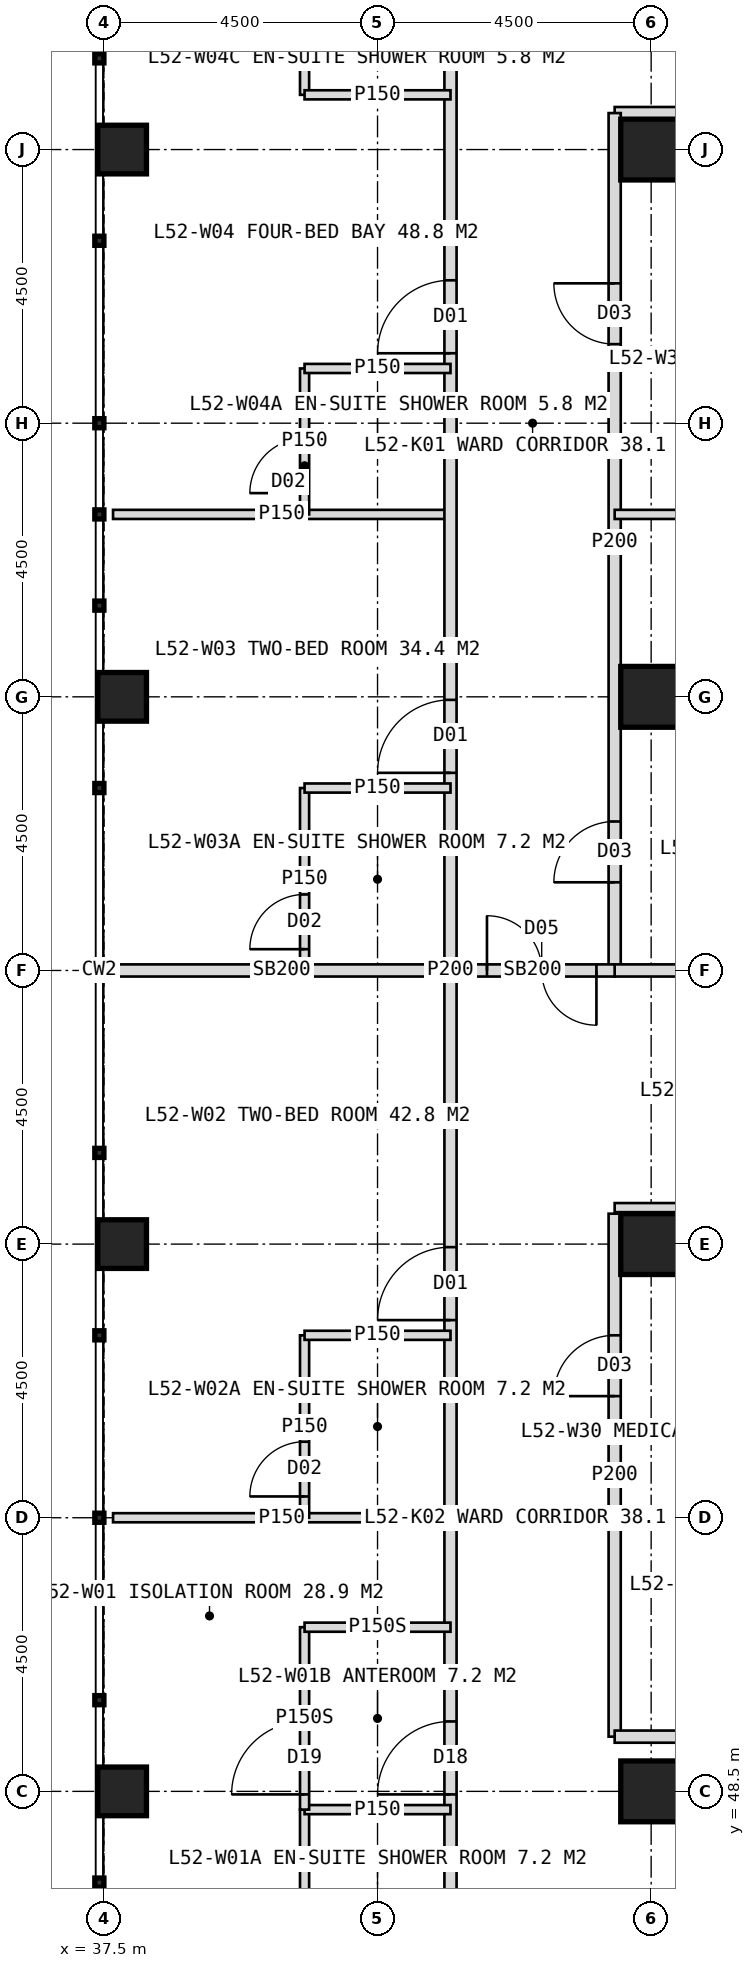
"""IFC4 building model, lengths in metres.
Left out: names, types, materials, properties, quantities, classifications, styles, units other than length and angle.
Written with IfcOpenShell. Run it as: python <this file> out.ifc"""

import sys

from ifc_helpers import new_model, si_unit, direction, frame, frame_2d, origin, origin_2d, place, context, subcontext, project, spatial, rectangle, hollow_rectangle, extrude, element, fill, save


model = new_model("IFC4")
c1 = context("Model", 3, precision=1e-05, world=origin(), true_north=direction((0.0, 1.0)))
c2 = subcontext(c1, "Body", "Model", "MODEL_VIEW")
j1 = project(units=[si_unit("LENGTHUNIT", "METRE"), si_unit("PLANEANGLEUNIT", "RADIAN")], contexts=[c1])
p1 = place(None, origin())
s1 = spatial("IfcSite", under=j1, at=p1, CompositionType="ELEMENT")
p2 = place(p1, origin())
s2 = spatial("IfcBuilding", under=s1, at=p2, CompositionType="ELEMENT")
p3 = place(p2, frame((0.0, 0.0, 217.0)))
s3 = spatial("IfcBuildingStorey", under=s2, at=p3, CompositionType="ELEMENT", Elevation=217.0)
for number, where, z_axis, x_axis in (
    (1, (46.5, 48.5, 0.0), (0.0, 0.0, 1.0), (1.0, 0.0, 0.0)),
    (2, (46.5, 75.5, 0.0), (0.0, 0.0, 1.0), (1.0, 0.0, 0.0)),
    (3, (46.5, 57.5, 0.0), (0.0, 0.0, 1.0), (1.0, 0.0, 0.0)),
    (4, (46.5, 66.5, 0.0), (0.0, 0.0, 1.0), (1.0, 0.0, 0.0)),
):
    element("IfcColumn", number, at=place(p3, frame(where, z_axis=z_axis, x_axis=x_axis)), inside=s3, PredefinedType="COLUMN", context=c2, shape_type="SweptSolid", body=[
        extrude(hollow_rectangle(XDim=1.0, YDim=1.0, WallThickness=0.1, at=origin_2d()), origin(), (0.0, 0.0, 1.0), 4.0),
    ])
for number, where, z_axis, x_axis in (
    (5, (37.8, 48.5, 0.0), (0.0, 0.0, 1.0), (1.0, 0.0, 0.0)),
    (6, (37.8, 57.5, 0.0), (0.0, 0.0, 1.0), (1.0, 0.0, 0.0)),
    (7, (37.8, 66.5, 0.0), (0.0, 0.0, 1.0), (1.0, 0.0, 0.0)),
    (8, (37.8, 75.5, 0.0), (0.0, 0.0, 1.0), (1.0, 0.0, 0.0)),
):
    element("IfcColumn", number, at=place(p3, frame(where, z_axis=z_axis, x_axis=x_axis)), inside=s3, PredefinedType="COLUMN", context=c2, shape_type="SweptSolid", body=[
        extrude(hollow_rectangle(XDim=0.8, YDim=0.8, WallThickness=0.08, at=origin_2d()), origin(), (0.0, 0.0, 1.0), 4.0),
    ])
p4 = place(p3, frame((45.9, 76.1, 0.0), z_axis=(0.0, 0.0, 1.0), x_axis=(1.0, 0.0, 0.0)))
e9 = element("IfcWall", 9, at=p4, inside=s3, PredefinedType="PARTITIONING", context=c2, shape_type="SweptSolid", body=[
    extrude(rectangle(XDim=5.1, YDim=0.2, at=frame_2d((2.55, 0.0))), origin(), (0.0, 0.0, 1.0), 3.75),
])
p5 = place(p3, frame((43.2, 53.0, 0.0), z_axis=(0.0, 0.0, 1.0), x_axis=(-1.0, 0.0, 0.0)))
e10 = element("IfcWall", 10, at=p5, inside=s3, PredefinedType="PARTITIONING", context=c2, shape_type="SweptSolid", body=[
    extrude(rectangle(XDim=5.55, YDim=0.15, at=frame_2d((2.775, 0.0))), origin(), (0.0, 0.0, 1.0), 3.75),
])
p6 = place(p3, frame((43.2, 62.0, 0.0), z_axis=(0.0, 0.0, 1.0), x_axis=(-1.0, 0.0, 0.0)))
e11 = element("IfcWall", 11, at=p6, inside=s3, PredefinedType="SOLIDWALL", context=c2, shape_type="SweptSolid", body=[
    extrude(rectangle(XDim=5.55, YDim=0.2, at=frame_2d((2.775, 0.0))), origin(), (0.0, 0.0, 1.0), 2.95),
])
p7 = place(p3, frame((43.2, 69.5, 0.0), z_axis=(0.0, 0.0, 1.0), x_axis=(-1.0, 0.0, 0.0)))
e12 = element("IfcWall", 12, at=p7, inside=s3, PredefinedType="PARTITIONING", context=c2, shape_type="SweptSolid", body=[
    extrude(rectangle(XDim=5.55, YDim=0.15, at=frame_2d((2.775, 0.0))), origin(), (0.0, 0.0, 1.0), 3.75),
])
p8 = place(p3, frame((43.2, 45.2, 0.0), z_axis=(0.0, 0.0, 1.0), x_axis=(0.0, 1.0, 0.0)))
e13 = element("IfcWall", 13, at=p8, inside=s3, PredefinedType="PARTITIONING", context=c2, shape_type="SweptSolid", body=[
    extrude(rectangle(XDim=33.6, YDim=0.2, at=frame_2d((16.8, 0.0))), origin(), (0.0, 0.0, 1.0), 3.75),
])
p9 = place(p8, frame((3.25, 0.0, 0.0)))
e14 = element("IfcOpeningElement", 14, at=p9, cuts=e13, PredefinedType="OPENING", context=c2, shape_type="SweptSolid", body=[
    extrude(rectangle(XDim=1.2, YDim=2.2, at=frame_2d((0.6, 1.1))), frame((0.0, 0.11, 0.0), z_axis=(0.0, -1.0, 0.0), x_axis=(1.0, 0.0, 0.0)), (0.0, 0.0, 1.0), 0.22),
])
p10 = place(p8, frame((11.05, 0.0, 0.0)))
e15 = element("IfcOpeningElement", 15, at=p10, cuts=e13, PredefinedType="OPENING", context=c2, shape_type="SweptSolid", body=[
    extrude(rectangle(XDim=1.2, YDim=2.2, at=frame_2d((0.6, 1.1))), frame((0.0, 0.11, 0.0), z_axis=(0.0, -1.0, 0.0), x_axis=(1.0, 0.0, 0.0)), (0.0, 0.0, 1.0), 0.22),
])
p11 = place(p8, frame((20.05, 0.0, 0.0)))
e16 = element("IfcOpeningElement", 16, at=p11, cuts=e13, PredefinedType="OPENING", context=c2, shape_type="SweptSolid", body=[
    extrude(rectangle(XDim=1.2, YDim=2.2, at=frame_2d((0.6, 1.1))), frame((0.0, 0.11, 0.0), z_axis=(0.0, -1.0, 0.0), x_axis=(1.0, 0.0, 0.0)), (0.0, 0.0, 1.0), 0.22),
])
p12 = place(p8, frame((26.95, 0.0, 0.0)))
e17 = element("IfcOpeningElement", 17, at=p12, cuts=e13, PredefinedType="OPENING", context=c2, shape_type="SweptSolid", body=[
    extrude(rectangle(XDim=1.2, YDim=2.2, at=frame_2d((0.6, 1.1))), frame((0.0, 0.11, 0.0), z_axis=(0.0, -1.0, 0.0), x_axis=(1.0, 0.0, 0.0)), (0.0, 0.0, 1.0), 0.22),
])
p13 = place(p3, frame((40.8, 45.2, 0.0), z_axis=(0.0, 0.0, 1.0), x_axis=(0.0, 1.0, 0.0)))
e18 = element("IfcWall", 18, at=p13, inside=s3, PredefinedType="PARTITIONING", context=c2, shape_type="SweptSolid", body=[
    extrude(rectangle(XDim=3.0, YDim=0.15, at=frame_2d((1.5, 0.0))), origin(), (0.0, 0.0, 1.0), 3.75),
])
p14 = place(p13, frame((0.35, 0.0, 0.0)))
e19 = element("IfcOpeningElement", 19, at=p14, cuts=e18, PredefinedType="OPENING", context=c2, shape_type="SweptSolid", body=[
    extrude(rectangle(XDim=0.9, YDim=2.1, at=frame_2d((0.45, 1.05))), frame((0.0, 0.085, 0.0), z_axis=(0.0, -1.0, 0.0), x_axis=(1.0, 0.0, 0.0)), (0.0, 0.0, 1.0), 0.17),
])
p15 = place(p3, frame((43.2, 48.2, 0.0), z_axis=(0.0, 0.0, 1.0), x_axis=(-1.0, 0.0, 0.0)))
e20 = element("IfcWall", 20, at=p15, inside=s3, PredefinedType="PARTITIONING", context=c2, shape_type="SweptSolid", body=[
    extrude(rectangle(XDim=2.4, YDim=0.15, at=frame_2d((1.2, 0.0))), origin(), (0.0, 0.0, 1.0), 3.75),
])
p16 = place(p3, frame((40.8, 48.2, 0.0), z_axis=(0.0, 0.0, 1.0), x_axis=(0.0, 1.0, 0.0)))
e21 = element("IfcWall", 21, at=p16, inside=s3, PredefinedType="PARTITIONING", context=c2, shape_type="SweptSolid", body=[
    extrude(rectangle(XDim=3.0, YDim=0.15, at=frame_2d((1.5, 0.0))), origin(), (0.0, 0.0, 1.0), 3.75),
])
p17 = place(p16, frame((0.25, 0.0, 0.0)))
e22 = element("IfcOpeningElement", 22, at=p17, cuts=e21, PredefinedType="OPENING", context=c2, shape_type="SweptSolid", body=[
    extrude(rectangle(XDim=1.2, YDim=2.2, at=frame_2d((0.6, 1.1))), frame((0.0, 0.085, 0.0), z_axis=(0.0, -1.0, 0.0), x_axis=(1.0, 0.0, 0.0)), (0.0, 0.0, 1.0), 0.17),
])
p18 = place(p3, frame((43.2, 51.2, 0.0), z_axis=(0.0, 0.0, 1.0), x_axis=(-1.0, 0.0, 0.0)))
e23 = element("IfcWall", 23, at=p18, inside=s3, PredefinedType="PARTITIONING", context=c2, shape_type="SweptSolid", body=[
    extrude(rectangle(XDim=2.4, YDim=0.15, at=frame_2d((1.2, 0.0))), origin(), (0.0, 0.0, 1.0), 3.75),
])
p19 = place(p3, frame((40.8, 53.0, 0.0), z_axis=(0.0, 0.0, 1.0), x_axis=(0.0, 1.0, 0.0)))
e24 = element("IfcWall", 24, at=p19, inside=s3, PredefinedType="PARTITIONING", context=c2, shape_type="SweptSolid", body=[
    extrude(rectangle(XDim=3.0, YDim=0.15, at=frame_2d((1.5, 0.0))), origin(), (0.0, 0.0, 1.0), 3.75),
])
p20 = place(p19, frame((0.35, 0.0, 0.0)))
e25 = element("IfcOpeningElement", 25, at=p20, cuts=e24, PredefinedType="OPENING", context=c2, shape_type="SweptSolid", body=[
    extrude(rectangle(XDim=0.9, YDim=2.1, at=frame_2d((0.45, 1.05))), frame((0.0, 0.085, 0.0), z_axis=(0.0, -1.0, 0.0), x_axis=(1.0, 0.0, 0.0)), (0.0, 0.0, 1.0), 0.17),
])
p21 = place(p3, frame((43.2, 56.0, 0.0), z_axis=(0.0, 0.0, 1.0), x_axis=(-1.0, 0.0, 0.0)))
e26 = element("IfcWall", 26, at=p21, inside=s3, PredefinedType="PARTITIONING", context=c2, shape_type="SweptSolid", body=[
    extrude(rectangle(XDim=2.4, YDim=0.15, at=frame_2d((1.2, 0.0))), origin(), (0.0, 0.0, 1.0), 3.75),
])
p22 = place(p3, frame((40.8, 62.0, 0.0), z_axis=(0.0, 0.0, 1.0), x_axis=(0.0, 1.0, 0.0)))
e27 = element("IfcWall", 27, at=p22, inside=s3, PredefinedType="PARTITIONING", context=c2, shape_type="SweptSolid", body=[
    extrude(rectangle(XDim=3.0, YDim=0.15, at=frame_2d((1.5, 0.0))), origin(), (0.0, 0.0, 1.0), 3.75),
])
p23 = place(p22, frame((0.35, 0.0, 0.0)))
e28 = element("IfcOpeningElement", 28, at=p23, cuts=e27, PredefinedType="OPENING", context=c2, shape_type="SweptSolid", body=[
    extrude(rectangle(XDim=0.9, YDim=2.1, at=frame_2d((0.45, 1.05))), frame((0.0, 0.085, 0.0), z_axis=(0.0, -1.0, 0.0), x_axis=(1.0, 0.0, 0.0)), (0.0, 0.0, 1.0), 0.17),
])
p24 = place(p3, frame((43.2, 65.0, 0.0), z_axis=(0.0, 0.0, 1.0), x_axis=(-1.0, 0.0, 0.0)))
e29 = element("IfcWall", 29, at=p24, inside=s3, PredefinedType="PARTITIONING", context=c2, shape_type="SweptSolid", body=[
    extrude(rectangle(XDim=2.4, YDim=0.15, at=frame_2d((1.2, 0.0))), origin(), (0.0, 0.0, 1.0), 3.75),
])
p25 = place(p3, frame((40.8, 69.5, 0.0), z_axis=(0.0, 0.0, 1.0), x_axis=(0.0, 1.0, 0.0)))
e30 = element("IfcWall", 30, at=p25, inside=s3, PredefinedType="PARTITIONING", context=c2, shape_type="SweptSolid", body=[
    extrude(rectangle(XDim=2.4, YDim=0.15, at=frame_2d((1.2, 0.0))), origin(), (0.0, 0.0, 1.0), 3.75),
])
p26 = place(p25, frame((0.35, 0.0, 0.0)))
e31 = element("IfcOpeningElement", 31, at=p26, cuts=e30, PredefinedType="OPENING", context=c2, shape_type="SweptSolid", body=[
    extrude(rectangle(XDim=0.9, YDim=2.1, at=frame_2d((0.45, 1.05))), frame((0.0, 0.085, 0.0), z_axis=(0.0, -1.0, 0.0), x_axis=(1.0, 0.0, 0.0)), (0.0, 0.0, 1.0), 0.17),
])
p27 = place(p3, frame((43.2, 71.9, 0.0), z_axis=(0.0, 0.0, 1.0), x_axis=(-1.0, 0.0, 0.0)))
e32 = element("IfcWall", 32, at=p27, inside=s3, PredefinedType="PARTITIONING", context=c2, shape_type="SweptSolid", body=[
    extrude(rectangle(XDim=2.4, YDim=0.15, at=frame_2d((1.2, 0.0))), origin(), (0.0, 0.0, 1.0), 3.75),
])
p28 = place(p3, frame((40.8, 76.4, 0.0), z_axis=(0.0, 0.0, 1.0), x_axis=(0.0, 1.0, 0.0)))
e33 = element("IfcWall", 33, at=p28, inside=s3, PredefinedType="PARTITIONING", context=c2, shape_type="SweptSolid", body=[
    extrude(rectangle(XDim=2.4, YDim=0.15, at=frame_2d((1.2, 0.0))), origin(), (0.0, 0.0, 1.0), 3.75),
])
p29 = place(p28, frame((1.15, 0.0, 0.0)))
e34 = element("IfcOpeningElement", 34, at=p29, cuts=e33, PredefinedType="OPENING", context=c2, shape_type="SweptSolid", body=[
    extrude(rectangle(XDim=0.9, YDim=2.1, at=frame_2d((0.45, 1.05))), frame((0.0, 0.085, 0.0), z_axis=(0.0, -1.0, 0.0), x_axis=(1.0, 0.0, 0.0)), (0.0, 0.0, 1.0), 0.17),
])
p30 = place(p3, frame((43.2, 76.4, 0.0), z_axis=(0.0, 0.0, 1.0), x_axis=(-1.0, 0.0, 0.0)))
e35 = element("IfcWall", 35, at=p30, inside=s3, PredefinedType="PARTITIONING", context=c2, shape_type="SweptSolid", body=[
    extrude(rectangle(XDim=2.4, YDim=0.15, at=frame_2d((1.2, 0.0))), origin(), (0.0, 0.0, 1.0), 3.75),
])
p31 = place(p3, frame((51.0, 53.0, 0.0), z_axis=(0.0, 0.0, 1.0), x_axis=(-1.0, 0.0, 0.0)))
e36 = element("IfcWall", 36, at=p31, inside=s3, PredefinedType="PARTITIONING", context=c2, shape_type="SweptSolid", body=[
    extrude(rectangle(XDim=5.1, YDim=0.15, at=frame_2d((2.55, 0.0))), origin(), (0.0, 0.0, 1.0), 3.75),
])
p32 = place(p3, frame((45.9, 49.4, 0.0), z_axis=(0.0, 0.0, 1.0), x_axis=(0.0, 1.0, 0.0)))
e37 = element("IfcWall", 37, at=p32, inside=s3, PredefinedType="PARTITIONING", context=c2, shape_type="SweptSolid", body=[
    extrude(rectangle(XDim=8.6, YDim=0.2, at=frame_2d((4.3, 0.0))), origin(), (0.0, 0.0, 1.0), 3.75),
])
p33 = place(p32, frame((5.6, 0.0, 0.0)))
e38 = element("IfcOpeningElement", 38, at=p33, cuts=e37, PredefinedType="OPENING", context=c2, shape_type="SweptSolid", body=[
    extrude(rectangle(XDim=1.0, YDim=2.1, at=frame_2d((0.5, 1.05))), frame((0.0, 0.11, 0.0), z_axis=(0.0, -1.0, 0.0), x_axis=(1.0, 0.0, 0.0)), (0.0, 0.0, 1.0), 0.22),
])
p34 = place(p3, frame((45.9, 62.0, 0.0), z_axis=(0.0, 0.0, 1.0), x_axis=(0.0, 1.0, 0.0)))
e39 = element("IfcWall", 39, at=p34, inside=s3, PredefinedType="PARTITIONING", context=c2, shape_type="SweptSolid", body=[
    extrude(rectangle(XDim=14.1, YDim=0.2, at=frame_2d((7.05, 0.0))), origin(), (0.0, 0.0, 1.0), 3.75),
])
p35 = place(p34, frame((1.45, 0.0, 0.0)))
e40 = element("IfcOpeningElement", 40, at=p35, cuts=e39, PredefinedType="OPENING", context=c2, shape_type="SweptSolid", body=[
    extrude(rectangle(XDim=1.0, YDim=2.1, at=frame_2d((0.5, 1.05))), frame((0.0, 0.11, 0.0), z_axis=(0.0, -1.0, 0.0), x_axis=(1.0, 0.0, 0.0)), (0.0, 0.0, 1.0), 0.22),
])
p36 = place(p34, frame((10.3, 0.0, 0.0)))
e41 = element("IfcOpeningElement", 41, at=p36, cuts=e39, PredefinedType="OPENING", context=c2, shape_type="SweptSolid", body=[
    extrude(rectangle(XDim=1.0, YDim=2.1, at=frame_2d((0.5, 1.05))), frame((0.0, 0.11, 0.0), z_axis=(0.0, -1.0, 0.0), x_axis=(1.0, 0.0, 0.0)), (0.0, 0.0, 1.0), 0.22),
])
p37 = place(p3, frame((51.0, 58.1, 0.0), z_axis=(0.0, 0.0, 1.0), x_axis=(-1.0, 0.0, 0.0)))
e42 = element("IfcWall", 42, at=p37, inside=s3, PredefinedType="PARTITIONING", context=c2, shape_type="SweptSolid", body=[
    extrude(rectangle(XDim=5.1, YDim=0.15, at=frame_2d((2.55, 0.0))), origin(), (0.0, 0.0, 1.0), 3.75),
])
p38 = place(p37, frame((0.6, 0.0, 0.0)))
e43 = element("IfcOpeningElement", 43, at=p38, cuts=e42, PredefinedType="OPENING", context=c2, shape_type="SweptSolid", body=[
    extrude(rectangle(XDim=0.9, YDim=2.1, at=frame_2d((0.45, 1.05))), frame((0.0, 0.085, 0.0), z_axis=(0.0, -1.0, 0.0), x_axis=(1.0, 0.0, 0.0)), (0.0, 0.0, 1.0), 0.17),
])
p39 = place(p3, frame((51.0, 62.0, 0.0), z_axis=(0.0, 0.0, 1.0), x_axis=(-1.0, 0.0, 0.0)))
e44 = element("IfcWall", 44, at=p39, inside=s3, PredefinedType="SOLIDWALL", context=c2, shape_type="SweptSolid", body=[
    extrude(rectangle(XDim=5.1, YDim=0.2, at=frame_2d((2.55, 0.0))), origin(), (0.0, 0.0, 1.0), 2.95),
])
p40 = place(p3, frame((51.0, 69.5, 0.0), z_axis=(0.0, 0.0, 1.0), x_axis=(-1.0, 0.0, 0.0)))
e45 = element("IfcWall", 45, at=p40, inside=s3, PredefinedType="PARTITIONING", context=c2, shape_type="SweptSolid", body=[
    extrude(rectangle(XDim=5.1, YDim=0.15, at=frame_2d((2.55, 0.0))), origin(), (0.0, 0.0, 1.0), 3.75),
])
p41 = place(p3, frame((57.75, 49.4, 0.0), z_axis=(0.0, 0.0, 1.0), x_axis=(-1.0, 0.0, 0.0)))
e46 = element("IfcWall", 46, at=p41, inside=s3, PredefinedType="PARTITIONING", context=c2, shape_type="SweptSolid", body=[
    extrude(rectangle(XDim=11.85, YDim=0.2, at=frame_2d((5.925, 0.0))), origin(), (0.0, 0.0, 1.0), 3.75),
])
p42 = place(p41, frame((3.55, 0.0, 0.0)))
e47 = element("IfcOpeningElement", 47, at=p42, cuts=e46, PredefinedType="OPENING", context=c2, shape_type="SweptSolid", body=[
    extrude(rectangle(XDim=1.0, YDim=2.1, at=frame_2d((0.5, 1.05))), frame((0.0, 0.11, 0.0), z_axis=(0.0, -1.0, 0.0), x_axis=(1.0, 0.0, 0.0)), (0.0, 0.0, 1.0), 0.22),
])
p43 = place(p41, frame((8.05, 0.0, 0.0)))
e48 = element("IfcOpeningElement", 48, at=p43, cuts=e46, PredefinedType="OPENING", context=c2, shape_type="SweptSolid", body=[
    extrude(rectangle(XDim=1.0, YDim=2.1, at=frame_2d((0.5, 1.05))), frame((0.0, 0.11, 0.0), z_axis=(0.0, -1.0, 0.0), x_axis=(1.0, 0.0, 0.0)), (0.0, 0.0, 1.0), 0.22),
])
p44 = place(p3, frame((45.9, 62.0, 0.0), z_axis=(0.0, 0.0, 1.0), x_axis=(-1.0, 0.0, 0.0)))
e49 = element("IfcWall", 49, at=p44, inside=s3, PredefinedType="SOLIDWALL", context=c2, shape_type="SweptSolid", body=[
    extrude(rectangle(XDim=2.7, YDim=0.2, at=frame_2d((1.35, 0.0))), origin(), (0.0, 0.0, 1.0), 2.95),
])
p45 = place(p44, frame((0.3, 0.0, 0.0)))
e50 = element("IfcOpeningElement", 50, at=p45, cuts=e49, PredefinedType="OPENING", context=c2, shape_type="SweptSolid", body=[
    extrude(rectangle(XDim=1.8, YDim=2.2, at=frame_2d((0.9, 1.1))), frame((0.0, 0.11, 0.0), z_axis=(0.0, -1.0, 0.0), x_axis=(1.0, 0.0, 0.0)), (0.0, 0.0, 1.0), 0.22),
])
p46 = place(p17, origin())
e51 = element("IfcDoor", 51, at=p46, inside=s3, OperationType="SINGLE_SWING_LEFT", PredefinedType="DOOR", context=c2, shape_type="SweptSolid", body=[
    extrude(rectangle(XDim=1.2, YDim=2.2, at=frame_2d((0.6, 1.1))), frame((0.0, 0.025, 0.0), z_axis=(0.0, -1.0, 0.0), x_axis=(1.0, 0.0, 0.0)), (0.0, 0.0, 1.0), 0.05),
])
fill(e22, e51)
p47 = place(p9, origin())
e52 = element("IfcDoor", 52, at=p47, inside=s3, OperationType="SINGLE_SWING_LEFT", PredefinedType="DOOR", context=c2, shape_type="SweptSolid", body=[
    extrude(rectangle(XDim=1.2, YDim=2.2, at=frame_2d((0.6, 1.1))), frame((0.0, 0.025, 0.0), z_axis=(0.0, -1.0, 0.0), x_axis=(1.0, 0.0, 0.0)), (0.0, 0.0, 1.0), 0.05),
])
fill(e14, e52)
p48 = place(p10, origin())
e53 = element("IfcDoor", 53, at=p48, inside=s3, OperationType="SINGLE_SWING_LEFT", PredefinedType="DOOR", context=c2, shape_type="SweptSolid", body=[
    extrude(rectangle(XDim=1.2, YDim=2.2, at=frame_2d((0.6, 1.1))), frame((0.0, 0.025, 0.0), z_axis=(0.0, -1.0, 0.0), x_axis=(1.0, 0.0, 0.0)), (0.0, 0.0, 1.0), 0.05),
])
fill(e15, e53)
p49 = place(p20, origin())
e54 = element("IfcDoor", 54, at=p49, inside=s3, OperationType="SINGLE_SWING_LEFT", PredefinedType="DOOR", context=c2, shape_type="SweptSolid", body=[
    extrude(rectangle(XDim=0.9, YDim=2.1, at=frame_2d((0.45, 1.05))), frame((0.0, 0.025, 0.0), z_axis=(0.0, -1.0, 0.0), x_axis=(1.0, 0.0, 0.0)), (0.0, 0.0, 1.0), 0.05),
])
fill(e25, e54)
p50 = place(p11, origin())
e55 = element("IfcDoor", 55, at=p50, inside=s3, OperationType="SINGLE_SWING_LEFT", PredefinedType="DOOR", context=c2, shape_type="SweptSolid", body=[
    extrude(rectangle(XDim=1.2, YDim=2.2, at=frame_2d((0.6, 1.1))), frame((0.0, 0.025, 0.0), z_axis=(0.0, -1.0, 0.0), x_axis=(1.0, 0.0, 0.0)), (0.0, 0.0, 1.0), 0.05),
])
fill(e16, e55)
p51 = place(p23, origin())
e56 = element("IfcDoor", 56, at=p51, inside=s3, OperationType="SINGLE_SWING_LEFT", PredefinedType="DOOR", context=c2, shape_type="SweptSolid", body=[
    extrude(rectangle(XDim=0.9, YDim=2.1, at=frame_2d((0.45, 1.05))), frame((0.0, 0.025, 0.0), z_axis=(0.0, -1.0, 0.0), x_axis=(1.0, 0.0, 0.0)), (0.0, 0.0, 1.0), 0.05),
])
fill(e28, e56)
p52 = place(p12, origin())
e57 = element("IfcDoor", 57, at=p52, inside=s3, OperationType="SINGLE_SWING_LEFT", PredefinedType="DOOR", context=c2, shape_type="SweptSolid", body=[
    extrude(rectangle(XDim=1.2, YDim=2.2, at=frame_2d((0.6, 1.1))), frame((0.0, 0.025, 0.0), z_axis=(0.0, -1.0, 0.0), x_axis=(1.0, 0.0, 0.0)), (0.0, 0.0, 1.0), 0.05),
])
fill(e17, e57)
p53 = place(p26, origin())
e58 = element("IfcDoor", 58, at=p53, inside=s3, OperationType="SINGLE_SWING_LEFT", PredefinedType="DOOR", context=c2, shape_type="SweptSolid", body=[
    extrude(rectangle(XDim=0.9, YDim=2.1, at=frame_2d((0.45, 1.05))), frame((0.0, 0.025, 0.0), z_axis=(0.0, -1.0, 0.0), x_axis=(1.0, 0.0, 0.0)), (0.0, 0.0, 1.0), 0.05),
])
fill(e31, e58)
p54 = place(p33, origin())
e59 = element("IfcDoor", 59, at=p54, inside=s3, OperationType="SINGLE_SWING_LEFT", PredefinedType="DOOR", context=c2, shape_type="SweptSolid", body=[
    extrude(rectangle(XDim=1.0, YDim=2.1, at=frame_2d((0.5, 1.05))), frame((0.0, 0.025, 0.0), z_axis=(0.0, -1.0, 0.0), x_axis=(1.0, 0.0, 0.0)), (0.0, 0.0, 1.0), 0.05),
])
fill(e38, e59)
p55 = place(p35, origin())
e60 = element("IfcDoor", 60, at=p55, inside=s3, OperationType="SINGLE_SWING_LEFT", PredefinedType="DOOR", context=c2, shape_type="SweptSolid", body=[
    extrude(rectangle(XDim=1.0, YDim=2.1, at=frame_2d((0.5, 1.05))), frame((0.0, 0.025, 0.0), z_axis=(0.0, -1.0, 0.0), x_axis=(1.0, 0.0, 0.0)), (0.0, 0.0, 1.0), 0.05),
])
fill(e40, e60)
p56 = place(p36, origin())
e61 = element("IfcDoor", 61, at=p56, inside=s3, OperationType="SINGLE_SWING_RIGHT", PredefinedType="DOOR", context=c2, shape_type="SweptSolid", body=[
    extrude(rectangle(XDim=1.0, YDim=2.1, at=frame_2d((0.5, 1.05))), frame((0.0, 0.025, 0.0), z_axis=(0.0, -1.0, 0.0), x_axis=(1.0, 0.0, 0.0)), (0.0, 0.0, 1.0), 0.05),
])
fill(e41, e61)
p57 = place(p45, origin())
e62 = element("IfcDoor", 62, at=p57, inside=s3, OperationType="DOUBLE_DOOR_DOUBLE_SWING", PredefinedType="DOOR", context=c2, shape_type="SweptSolid", body=[
    extrude(rectangle(XDim=1.8, YDim=2.2, at=frame_2d((0.9, 1.1))), frame((0.0, 0.025, 0.0), z_axis=(0.0, -1.0, 0.0), x_axis=(1.0, 0.0, 0.0)), (0.0, 0.0, 1.0), 0.05),
])
fill(e50, e62)
save(model, sys.argv[1])
